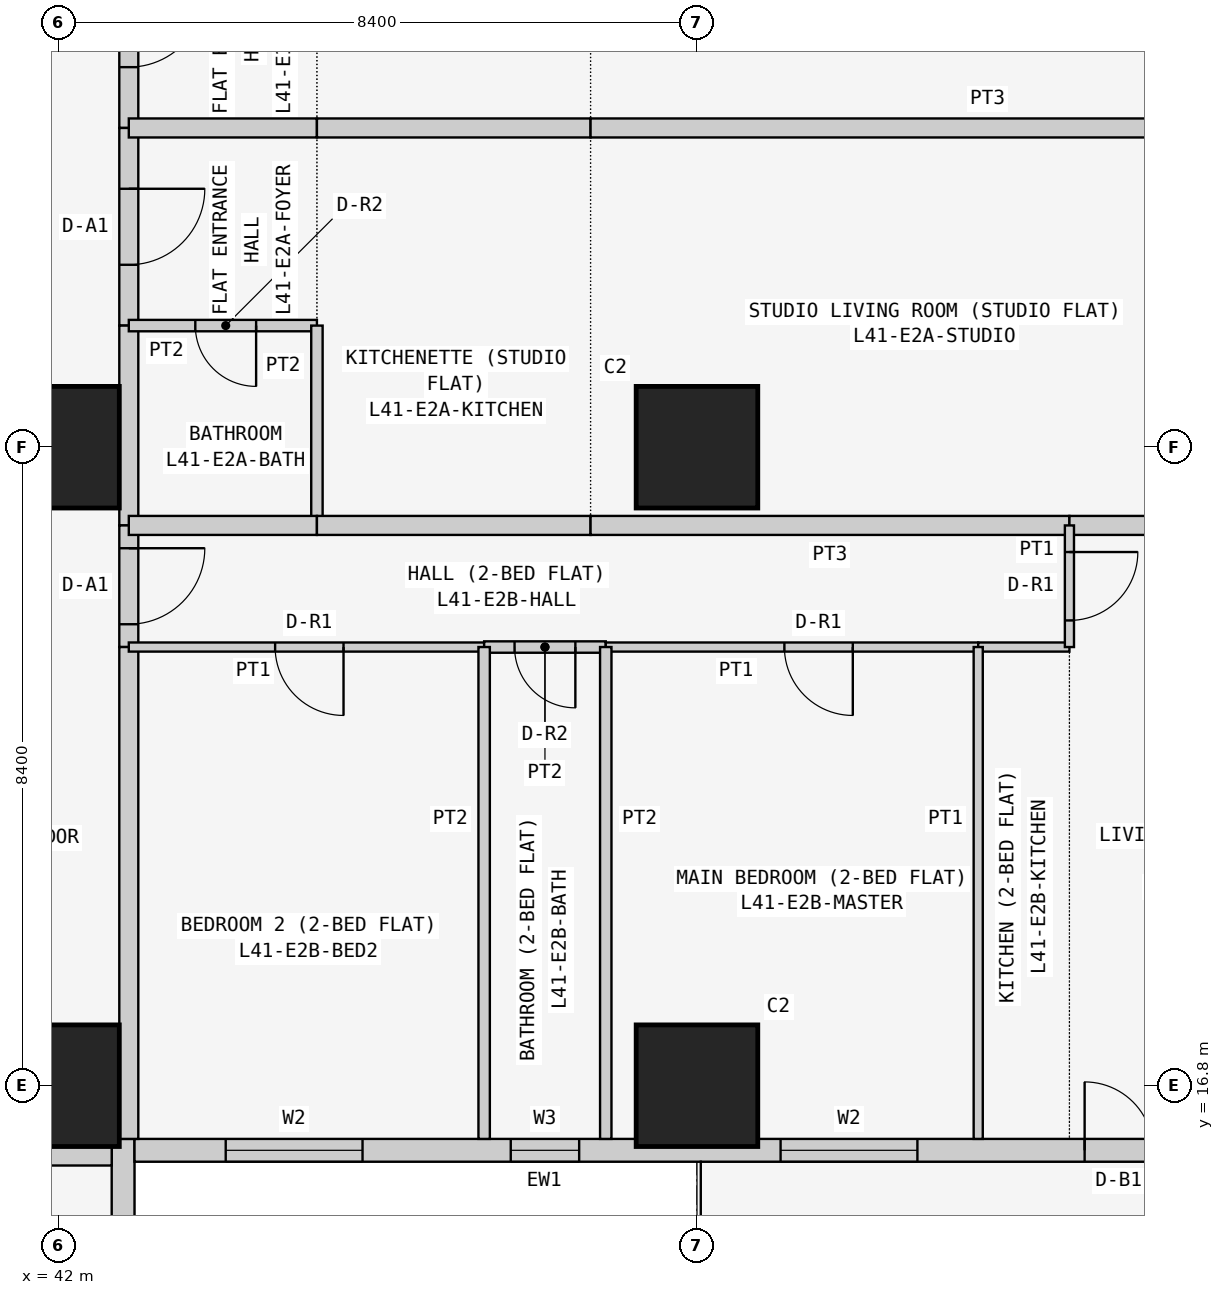
"""IFC4 building model, lengths in metres.
Left out: names, types, materials, properties, quantities, classifications, styles, units other than length and angle.
Written with IfcOpenShell. Run it as: python <this file> out.ifc"""

import sys

from ifc_helpers import new_model, si_unit, direction, frame, frame_2d, origin, origin_2d, place, context, subcontext, project, spatial, rectangle, extrude, element, fill, save


model = new_model("IFC4")
c1 = context("Model", 3, precision=1e-05, world=origin(), true_north=direction((0.0, 1.0)))
c2 = subcontext(c1, "Body", "Model", "MODEL_VIEW")
j1 = project(units=[si_unit("LENGTHUNIT", "METRE"), si_unit("PLANEANGLEUNIT", "RADIAN")], contexts=[c1])
p1 = place(None, origin())
s1 = spatial("IfcSite", under=j1, at=p1, CompositionType="ELEMENT")
p2 = place(p1, origin())
s2 = spatial("IfcBuilding", under=s1, at=p2, CompositionType="ELEMENT")
p3 = place(p2, frame((0.0, 0.0, 159.3)))
s3 = spatial("IfcBuildingStorey", under=s2, at=p3, CompositionType="ELEMENT", Elevation=159.3)
for number, where, z_axis, x_axis in (
    (1, (42.0, 16.8, 0.0), (0.0, 0.0, 1.0), (1.0, 0.0, 0.0)),
    (2, (42.0, 25.2, 0.0), (0.0, 0.0, 1.0), (1.0, 0.0, 0.0)),
    (3, (50.4, 16.8, 0.0), (0.0, 0.0, 1.0), (1.0, 0.0, 0.0)),
    (4, (50.4, 25.2, 0.0), (0.0, 0.0, 1.0), (1.0, 0.0, 0.0)),
):
    element("IfcColumn", number, at=place(p3, frame(where, z_axis=z_axis, x_axis=x_axis)), inside=s3, PredefinedType="COLUMN", context=c2, shape_type="SweptSolid", body=[
        extrude(rectangle(XDim=1.6, YDim=1.6, at=origin_2d()), origin(), (0.0, 0.0, 1.0), 3.6),
    ])
p4 = place(p3, frame((42.85, 8.8, 0.0), z_axis=(0.0, 0.0, 1.0), x_axis=(0.0, 1.0, 0.0)))
e5 = element("IfcWall", 5, at=p4, inside=s3, PredefinedType="SOLIDWALL", context=c2, shape_type="SweptSolid", body=[
    extrude(rectangle(XDim=7.3, YDim=0.3, at=frame_2d((3.65, 0.0))), origin(), (0.0, 0.0, 1.0), 3.45),
])
p5 = place(p4, frame((3.1, 0.0, 0.9)))
e6 = element("IfcOpeningElement", 6, at=p5, cuts=e5, PredefinedType="OPENING", context=c2, shape_type="SweptSolid", body=[
    extrude(rectangle(XDim=2.4, YDim=1.5, at=frame_2d((1.2, 0.75))), frame((0.0, 0.16, 0.0), z_axis=(0.0, -1.0, 0.0), x_axis=(1.0, 0.0, 0.0)), (0.0, 0.0, 1.0), 0.32),
])
p6 = place(p4, frame((0.75, 0.0, 0.9)))
e7 = element("IfcOpeningElement", 7, at=p6, cuts=e5, PredefinedType="OPENING", context=c2, shape_type="SweptSolid", body=[
    extrude(rectangle(XDim=1.2, YDim=1.5, at=frame_2d((0.6, 0.75))), frame((0.0, 0.16, 0.0), z_axis=(0.0, -1.0, 0.0), x_axis=(1.0, 0.0, 0.0)), (0.0, 0.0, 1.0), 0.32),
])
p7 = place(p3, frame((43.0, 15.95, 0.0), z_axis=(0.0, 0.0, 1.0), x_axis=(1.0, 0.0, 0.0)))
e8 = element("IfcWall", 8, at=p7, inside=s3, PredefinedType="SOLIDWALL", context=c2, shape_type="SweptSolid", body=[
    extrude(rectangle(XDim=15.4, YDim=0.3, at=frame_2d((7.7, 0.0))), origin(), (0.0, 0.0, 1.0), 3.45),
])
p8 = place(p7, frame((1.2, 0.0, 0.9)))
e9 = element("IfcOpeningElement", 9, at=p8, cuts=e8, PredefinedType="OPENING", context=c2, shape_type="SweptSolid", body=[
    extrude(rectangle(XDim=1.8, YDim=1.5, at=frame_2d((0.9, 0.75))), frame((0.0, 0.16, 0.0), z_axis=(0.0, -1.0, 0.0), x_axis=(1.0, 0.0, 0.0)), (0.0, 0.0, 1.0), 0.32),
])
p9 = place(p7, frame((4.95, 0.0, 1.5)))
e10 = element("IfcOpeningElement", 10, at=p9, cuts=e8, PredefinedType="OPENING", context=c2, shape_type="SweptSolid", body=[
    extrude(rectangle(XDim=0.9, YDim=0.7, at=frame_2d((0.45, 0.35))), frame((0.0, 0.16, 0.0), z_axis=(0.0, -1.0, 0.0), x_axis=(1.0, 0.0, 0.0)), (0.0, 0.0, 1.0), 0.32),
])
p10 = place(p7, frame((8.5, 0.0, 0.9)))
e11 = element("IfcOpeningElement", 11, at=p10, cuts=e8, PredefinedType="OPENING", context=c2, shape_type="SweptSolid", body=[
    extrude(rectangle(XDim=1.8, YDim=1.5, at=frame_2d((0.9, 0.75))), frame((0.0, 0.16, 0.0), z_axis=(0.0, -1.0, 0.0), x_axis=(1.0, 0.0, 0.0)), (0.0, 0.0, 1.0), 0.32),
])
p11 = place(p7, frame((12.5, 0.0, 0.0)))
e12 = element("IfcOpeningElement", 12, at=p11, cuts=e8, PredefinedType="OPENING", context=c2, shape_type="SweptSolid", body=[
    extrude(rectangle(XDim=0.9, YDim=2.4, at=frame_2d((0.45, 1.2))), frame((0.0, 0.16, 0.0), z_axis=(0.0, -1.0, 0.0), x_axis=(1.0, 0.0, 0.0)), (0.0, 0.0, 1.0), 0.32),
])
p12 = place(p7, frame((13.5, 0.0, 0.9)))
e13 = element("IfcOpeningElement", 13, at=p12, cuts=e8, PredefinedType="OPENING", context=c2, shape_type="SweptSolid", body=[
    extrude(rectangle(XDim=1.2, YDim=1.5, at=frame_2d((0.6, 0.75))), frame((0.0, 0.16, 0.0), z_axis=(0.0, -1.0, 0.0), x_axis=(1.0, 0.0, 0.0)), (0.0, 0.0, 1.0), 0.32),
])
p13 = place(p3, frame((42.925, 32.0, 0.0), z_axis=(0.0, 0.0, 1.0), x_axis=(0.0, -1.0, 0.0)))
e14 = element("IfcWall", 14, at=p13, inside=s3, PredefinedType="PARTITIONING", context=c2, shape_type="SweptSolid", body=[
    extrude(rectangle(XDim=2.6, YDim=0.25, at=frame_2d((1.3, 0.0))), origin(), (0.0, 0.0, 1.0), 3.45),
])
p14 = place(p13, frame((0.8, 0.0, 0.0)))
e15 = element("IfcOpeningElement", 15, at=p14, cuts=e14, PredefinedType="OPENING", context=c2, shape_type="SweptSolid", body=[
    extrude(rectangle(XDim=1.0, YDim=2.1, at=frame_2d((0.5, 1.05))), frame((0.0, 0.135, 0.0), z_axis=(0.0, -1.0, 0.0), x_axis=(1.0, 0.0, 0.0)), (0.0, 0.0, 1.0), 0.27),
])
p15 = place(p3, frame((42.925, 29.4, 0.0), z_axis=(0.0, 0.0, 1.0), x_axis=(0.0, -1.0, 0.0)))
e16 = element("IfcWall", 16, at=p15, inside=s3, PredefinedType="PARTITIONING", context=c2, shape_type="SweptSolid", body=[
    extrude(rectangle(XDim=2.6, YDim=0.25, at=frame_2d((1.3, 0.0))), origin(), (0.0, 0.0, 1.0), 3.45),
])
p16 = place(p15, frame((0.8, 0.0, 0.0)))
e17 = element("IfcOpeningElement", 17, at=p16, cuts=e16, PredefinedType="OPENING", context=c2, shape_type="SweptSolid", body=[
    extrude(rectangle(XDim=1.0, YDim=2.1, at=frame_2d((0.5, 1.05))), frame((0.0, 0.135, 0.0), z_axis=(0.0, -1.0, 0.0), x_axis=(1.0, 0.0, 0.0)), (0.0, 0.0, 1.0), 0.27),
])
p17 = place(p3, frame((42.925, 26.8, 0.0), z_axis=(0.0, 0.0, 1.0), x_axis=(0.0, -1.0, 0.0)))
e18 = element("IfcWall", 18, at=p17, inside=s3, PredefinedType="PARTITIONING", context=c2, shape_type="SweptSolid", body=[
    extrude(rectangle(XDim=2.629, YDim=0.25, at=frame_2d((1.314, 0.0))), origin(), (0.0, 0.0, 1.0), 3.45),
])
p18 = place(p3, frame((42.925, 24.171, 0.0), z_axis=(0.0, 0.0, 1.0), x_axis=(0.0, -1.0, 0.0)))
e19 = element("IfcWall", 19, at=p18, inside=s3, PredefinedType="PARTITIONING", context=c2, shape_type="SweptSolid", body=[
    extrude(rectangle(XDim=1.6, YDim=0.25, at=frame_2d((0.8, 0.0))), origin(), (0.0, 0.0, 1.0), 3.45),
])
p19 = place(p18, frame((0.3, 0.0, 0.0)))
e20 = element("IfcOpeningElement", 20, at=p19, cuts=e19, PredefinedType="OPENING", context=c2, shape_type="SweptSolid", body=[
    extrude(rectangle(XDim=1.0, YDim=2.1, at=frame_2d((0.5, 1.05))), frame((0.0, 0.135, 0.0), z_axis=(0.0, -1.0, 0.0), x_axis=(1.0, 0.0, 0.0)), (0.0, 0.0, 1.0), 0.27),
])
for number, where, z_axis, x_axis in (
    (21, (42.925, 22.571, 0.0), (0.0, 0.0, 1.0), (0.0, -1.0, 0.0)),
    (22, (42.7, 15.875, 0.0), (0.0, 0.0, 1.0), (-1.0, 0.0, 0.0)),
):
    element("IfcWall", number, at=place(p3, frame(where, z_axis=z_axis, x_axis=x_axis)), inside=s3, PredefinedType="PARTITIONING", context=c2, shape_type="SweptSolid", body=[
        extrude(rectangle(XDim=6.471, YDim=0.25, at=frame_2d((3.235, 0.0))), origin(), (0.0, 0.0, 1.0), 3.45),
    ])
p20 = place(p3, frame((42.925, 29.4, 0.0), z_axis=(0.0, 0.0, 1.0), x_axis=(1.0, 0.0, 0.0)))
e23 = element("IfcWall", 23, at=p20, inside=s3, PredefinedType="PARTITIONING", context=c2, shape_type="SweptSolid", body=[
    extrude(rectangle(XDim=2.475, YDim=0.25, at=frame_2d((1.237, 0.0))), origin(), (0.0, 0.0, 1.0), 3.45),
])
p21 = place(p3, frame((45.4, 29.4, 0.0), z_axis=(0.0, 0.0, 1.0), x_axis=(1.0, 0.0, 0.0)))
e24 = element("IfcWall", 24, at=p21, inside=s3, PredefinedType="PARTITIONING", context=c2, shape_type="SweptSolid", body=[
    extrude(rectangle(XDim=3.6, YDim=0.25, at=frame_2d((1.8, 0.0))), origin(), (0.0, 0.0, 1.0), 3.45),
])
p22 = place(p3, frame((49.0, 29.4, 0.0), z_axis=(0.0, 0.0, 1.0), x_axis=(1.0, 0.0, 0.0)))
e25 = element("IfcWall", 25, at=p22, inside=s3, PredefinedType="PARTITIONING", context=c2, shape_type="SweptSolid", body=[
    extrude(rectangle(XDim=10.45, YDim=0.25, at=frame_2d((5.225, 0.0))), origin(), (0.0, 0.0, 1.0), 3.45),
])
p23 = place(p3, frame((45.4, 26.8, 0.0), z_axis=(0.0, 0.0, 1.0), x_axis=(-1.0, 0.0, 0.0)))
e26 = element("IfcWall", 26, at=p23, inside=s3, PredefinedType="PARTITIONING", context=c2, shape_type="SweptSolid", body=[
    extrude(rectangle(XDim=2.475, YDim=0.15, at=frame_2d((1.237, 0.0))), origin(), (0.0, 0.0, 1.0), 3.45),
])
p24 = place(p23, frame((0.8, 0.0, 0.0)))
e27 = element("IfcOpeningElement", 27, at=p24, cuts=e26, PredefinedType="OPENING", context=c2, shape_type="SweptSolid", body=[
    extrude(rectangle(XDim=0.8, YDim=2.1, at=frame_2d((0.4, 1.05))), frame((0.0, 0.085, 0.0), z_axis=(0.0, -1.0, 0.0), x_axis=(1.0, 0.0, 0.0)), (0.0, 0.0, 1.0), 0.17),
])
p25 = place(p3, frame((45.4, 26.8, 0.0), z_axis=(0.0, 0.0, 1.0), x_axis=(0.0, -1.0, 0.0)))
e28 = element("IfcWall", 28, at=p25, inside=s3, PredefinedType="PARTITIONING", context=c2, shape_type="SweptSolid", body=[
    extrude(rectangle(XDim=2.629, YDim=0.15, at=frame_2d((1.314, 0.0))), origin(), (0.0, 0.0, 1.0), 3.45),
])
p26 = place(p3, frame((45.4, 24.171, 0.0), z_axis=(0.0, 0.0, 1.0), x_axis=(-1.0, 0.0, 0.0)))
e29 = element("IfcWall", 29, at=p26, inside=s3, PredefinedType="PARTITIONING", context=c2, shape_type="SweptSolid", body=[
    extrude(rectangle(XDim=2.475, YDim=0.25, at=frame_2d((1.237, 0.0))), origin(), (0.0, 0.0, 1.0), 3.45),
])
p27 = place(p3, frame((49.0, 24.171, 0.0), z_axis=(0.0, 0.0, 1.0), x_axis=(-1.0, 0.0, 0.0)))
e30 = element("IfcWall", 30, at=p27, inside=s3, PredefinedType="PARTITIONING", context=c2, shape_type="SweptSolid", body=[
    extrude(rectangle(XDim=3.6, YDim=0.25, at=frame_2d((1.8, 0.0))), origin(), (0.0, 0.0, 1.0), 3.45),
])
p28 = place(p3, frame((55.3, 24.171, 0.0), z_axis=(0.0, 0.0, 1.0), x_axis=(-1.0, 0.0, 0.0)))
e31 = element("IfcWall", 31, at=p28, inside=s3, PredefinedType="PARTITIONING", context=c2, shape_type="SweptSolid", body=[
    extrude(rectangle(XDim=6.3, YDim=0.25, at=frame_2d((3.15, 0.0))), origin(), (0.0, 0.0, 1.0), 3.45),
])
p29 = place(p3, frame((59.45, 24.171, 0.0), z_axis=(0.0, 0.0, 1.0), x_axis=(-1.0, 0.0, 0.0)))
e32 = element("IfcWall", 32, at=p29, inside=s3, PredefinedType="PARTITIONING", context=c2, shape_type="SweptSolid", body=[
    extrude(rectangle(XDim=4.15, YDim=0.25, at=frame_2d((2.075, 0.0))), origin(), (0.0, 0.0, 1.0), 3.45),
])
p30 = place(p3, frame((47.6, 22.571, 0.0), z_axis=(0.0, 0.0, 1.0), x_axis=(-1.0, 0.0, 0.0)))
e33 = element("IfcWall", 33, at=p30, inside=s3, PredefinedType="PARTITIONING", context=c2, shape_type="SweptSolid", body=[
    extrude(rectangle(XDim=4.675, YDim=0.12, at=frame_2d((2.337, 0.0))), origin(), (0.0, 0.0, 1.0), 3.45),
])
p31 = place(p30, frame((1.85, 0.0, 0.0)))
e34 = element("IfcOpeningElement", 34, at=p31, cuts=e33, PredefinedType="OPENING", context=c2, shape_type="SweptSolid", body=[
    extrude(rectangle(XDim=0.9, YDim=2.1, at=frame_2d((0.45, 1.05))), frame((0.0, 0.07, 0.0), z_axis=(0.0, -1.0, 0.0), x_axis=(1.0, 0.0, 0.0)), (0.0, 0.0, 1.0), 0.14),
])
p32 = place(p3, frame((49.2, 22.571, 0.0), z_axis=(0.0, 0.0, 1.0), x_axis=(-1.0, 0.0, 0.0)))
e35 = element("IfcWall", 35, at=p32, inside=s3, PredefinedType="PARTITIONING", context=c2, shape_type="SweptSolid", body=[
    extrude(rectangle(XDim=1.6, YDim=0.15, at=frame_2d((0.8, 0.0))), origin(), (0.0, 0.0, 1.0), 3.45),
])
p33 = place(p32, frame((0.4, 0.0, 0.0)))
e36 = element("IfcOpeningElement", 36, at=p33, cuts=e35, PredefinedType="OPENING", context=c2, shape_type="SweptSolid", body=[
    extrude(rectangle(XDim=0.8, YDim=2.1, at=frame_2d((0.4, 1.05))), frame((0.0, 0.085, 0.0), z_axis=(0.0, -1.0, 0.0), x_axis=(1.0, 0.0, 0.0)), (0.0, 0.0, 1.0), 0.17),
])
p34 = place(p3, frame((54.1, 22.571, 0.0), z_axis=(0.0, 0.0, 1.0), x_axis=(-1.0, 0.0, 0.0)))
e37 = element("IfcWall", 37, at=p34, inside=s3, PredefinedType="PARTITIONING", context=c2, shape_type="SweptSolid", body=[
    extrude(rectangle(XDim=4.9, YDim=0.12, at=frame_2d((2.45, 0.0))), origin(), (0.0, 0.0, 1.0), 3.45),
])
p35 = place(p34, frame((1.65, 0.0, 0.0)))
e38 = element("IfcOpeningElement", 38, at=p35, cuts=e37, PredefinedType="OPENING", context=c2, shape_type="SweptSolid", body=[
    extrude(rectangle(XDim=0.9, YDim=2.1, at=frame_2d((0.45, 1.05))), frame((0.0, 0.07, 0.0), z_axis=(0.0, -1.0, 0.0), x_axis=(1.0, 0.0, 0.0)), (0.0, 0.0, 1.0), 0.14),
])
p36 = place(p3, frame((55.3, 22.571, 0.0), z_axis=(0.0, 0.0, 1.0), x_axis=(-1.0, 0.0, 0.0)))
e39 = element("IfcWall", 39, at=p36, inside=s3, PredefinedType="PARTITIONING", context=c2, shape_type="SweptSolid", body=[
    extrude(rectangle(XDim=1.2, YDim=0.12, at=frame_2d((0.6, 0.0))), origin(), (0.0, 0.0, 1.0), 3.45),
])
p37 = place(p3, frame((55.3, 24.171, 0.0), z_axis=(0.0, 0.0, 1.0), x_axis=(0.0, -1.0, 0.0)))
e40 = element("IfcWall", 40, at=p37, inside=s3, PredefinedType="PARTITIONING", context=c2, shape_type="SweptSolid", body=[
    extrude(rectangle(XDim=1.6, YDim=0.12, at=frame_2d((0.8, 0.0))), origin(), (0.0, 0.0, 1.0), 3.45),
])
p38 = place(p37, frame((0.35, 0.0, 0.0)))
e41 = element("IfcOpeningElement", 41, at=p38, cuts=e40, PredefinedType="OPENING", context=c2, shape_type="SweptSolid", body=[
    extrude(rectangle(XDim=0.9, YDim=2.1, at=frame_2d((0.45, 1.05))), frame((0.0, 0.07, 0.0), z_axis=(0.0, -1.0, 0.0), x_axis=(1.0, 0.0, 0.0)), (0.0, 0.0, 1.0), 0.14),
])
for number, where, z_axis, x_axis in (
    (42, (47.6, 22.571, 0.0), (0.0, 0.0, 1.0), (0.0, -1.0, 0.0)),
    (43, (49.2, 22.571, 0.0), (0.0, 0.0, 1.0), (0.0, -1.0, 0.0)),
):
    element("IfcWall", number, at=place(p3, frame(where, z_axis=z_axis, x_axis=x_axis)), inside=s3, PredefinedType="PARTITIONING", context=c2, shape_type="SweptSolid", body=[
        extrude(rectangle(XDim=6.471, YDim=0.15, at=frame_2d((3.235, 0.0))), origin(), (0.0, 0.0, 1.0), 3.45),
    ])
p39 = place(p3, frame((54.1, 22.571, 0.0), z_axis=(0.0, 0.0, 1.0), x_axis=(0.0, -1.0, 0.0)))
e44 = element("IfcWall", 44, at=p39, inside=s3, PredefinedType="PARTITIONING", context=c2, shape_type="SweptSolid", body=[
    extrude(rectangle(XDim=6.471, YDim=0.12, at=frame_2d((3.235, 0.0))), origin(), (0.0, 0.0, 1.0), 3.45),
])
p40 = place(p8, origin())
e45 = element("IfcWindow", 45, at=p40, inside=s3, PartitioningType="SINGLE_PANEL", PredefinedType="WINDOW", context=c2, shape_type="SweptSolid", body=[
    extrude(rectangle(XDim=1.8, YDim=1.5, at=frame_2d((0.9, 0.75))), frame((0.0, 0.03, 0.0), z_axis=(0.0, -1.0, 0.0), x_axis=(1.0, 0.0, 0.0)), (0.0, 0.0, 1.0), 0.06),
])
fill(e9, e45)
p41 = place(p9, origin())
e46 = element("IfcWindow", 46, at=p41, inside=s3, PartitioningType="SINGLE_PANEL", PredefinedType="WINDOW", context=c2, shape_type="SweptSolid", body=[
    extrude(rectangle(XDim=0.9, YDim=0.7, at=frame_2d((0.45, 0.35))), frame((0.0, 0.03, 0.0), z_axis=(0.0, -1.0, 0.0), x_axis=(1.0, 0.0, 0.0)), (0.0, 0.0, 1.0), 0.06),
])
fill(e10, e46)
p42 = place(p10, origin())
e47 = element("IfcWindow", 47, at=p42, inside=s3, PartitioningType="SINGLE_PANEL", PredefinedType="WINDOW", context=c2, shape_type="SweptSolid", body=[
    extrude(rectangle(XDim=1.8, YDim=1.5, at=frame_2d((0.9, 0.75))), frame((0.0, 0.03, 0.0), z_axis=(0.0, -1.0, 0.0), x_axis=(1.0, 0.0, 0.0)), (0.0, 0.0, 1.0), 0.06),
])
fill(e11, e47)
p43 = place(p11, origin())
e48 = element("IfcDoor", 48, at=p43, inside=s3, OperationType="SINGLE_SWING_LEFT", PredefinedType="DOOR", context=c2, shape_type="SweptSolid", body=[
    extrude(rectangle(XDim=0.9, YDim=2.4, at=frame_2d((0.45, 1.2))), frame((0.0, 0.025, 0.0), z_axis=(0.0, -1.0, 0.0), x_axis=(1.0, 0.0, 0.0)), (0.0, 0.0, 1.0), 0.05),
])
fill(e12, e48)
p44 = place(p14, origin())
e49 = element("IfcDoor", 49, at=p44, inside=s3, OperationType="SINGLE_SWING_LEFT", PredefinedType="DOOR", context=c2, shape_type="SweptSolid", body=[
    extrude(rectangle(XDim=1.0, YDim=2.1, at=frame_2d((0.5, 1.05))), frame((0.0, 0.025, 0.0), z_axis=(0.0, -1.0, 0.0), x_axis=(1.0, 0.0, 0.0)), (0.0, 0.0, 1.0), 0.05),
])
fill(e15, e49)
p45 = place(p16, origin())
e50 = element("IfcDoor", 50, at=p45, inside=s3, OperationType="SINGLE_SWING_LEFT", PredefinedType="DOOR", context=c2, shape_type="SweptSolid", body=[
    extrude(rectangle(XDim=1.0, YDim=2.1, at=frame_2d((0.5, 1.05))), frame((0.0, 0.025, 0.0), z_axis=(0.0, -1.0, 0.0), x_axis=(1.0, 0.0, 0.0)), (0.0, 0.0, 1.0), 0.05),
])
fill(e17, e50)
p46 = place(p24, origin())
e51 = element("IfcDoor", 51, at=p46, inside=s3, OperationType="SINGLE_SWING_LEFT", PredefinedType="DOOR", context=c2, shape_type="SweptSolid", body=[
    extrude(rectangle(XDim=0.8, YDim=2.1, at=frame_2d((0.4, 1.05))), frame((0.0, 0.025, 0.0), z_axis=(0.0, -1.0, 0.0), x_axis=(1.0, 0.0, 0.0)), (0.0, 0.0, 1.0), 0.05),
])
fill(e27, e51)
p47 = place(p19, origin())
e52 = element("IfcDoor", 52, at=p47, inside=s3, OperationType="SINGLE_SWING_LEFT", PredefinedType="DOOR", context=c2, shape_type="SweptSolid", body=[
    extrude(rectangle(XDim=1.0, YDim=2.1, at=frame_2d((0.5, 1.05))), frame((0.0, 0.025, 0.0), z_axis=(0.0, -1.0, 0.0), x_axis=(1.0, 0.0, 0.0)), (0.0, 0.0, 1.0), 0.05),
])
fill(e20, e52)
p48 = place(p31, origin())
e53 = element("IfcDoor", 53, at=p48, inside=s3, OperationType="SINGLE_SWING_LEFT", PredefinedType="DOOR", context=c2, shape_type="SweptSolid", body=[
    extrude(rectangle(XDim=0.9, YDim=2.1, at=frame_2d((0.45, 1.05))), frame((0.0, 0.025, 0.0), z_axis=(0.0, -1.0, 0.0), x_axis=(1.0, 0.0, 0.0)), (0.0, 0.0, 1.0), 0.05),
])
fill(e34, e53)
p49 = place(p33, origin())
e54 = element("IfcDoor", 54, at=p49, inside=s3, OperationType="SINGLE_SWING_LEFT", PredefinedType="DOOR", context=c2, shape_type="SweptSolid", body=[
    extrude(rectangle(XDim=0.8, YDim=2.1, at=frame_2d((0.4, 1.05))), frame((0.0, 0.025, 0.0), z_axis=(0.0, -1.0, 0.0), x_axis=(1.0, 0.0, 0.0)), (0.0, 0.0, 1.0), 0.05),
])
fill(e36, e54)
p50 = place(p35, origin())
e55 = element("IfcDoor", 55, at=p50, inside=s3, OperationType="SINGLE_SWING_LEFT", PredefinedType="DOOR", context=c2, shape_type="SweptSolid", body=[
    extrude(rectangle(XDim=0.9, YDim=2.1, at=frame_2d((0.45, 1.05))), frame((0.0, 0.025, 0.0), z_axis=(0.0, -1.0, 0.0), x_axis=(1.0, 0.0, 0.0)), (0.0, 0.0, 1.0), 0.05),
])
fill(e38, e55)
p51 = place(p38, origin())
e56 = element("IfcDoor", 56, at=p51, inside=s3, OperationType="SINGLE_SWING_LEFT", PredefinedType="DOOR", context=c2, shape_type="SweptSolid", body=[
    extrude(rectangle(XDim=0.9, YDim=2.1, at=frame_2d((0.45, 1.05))), frame((0.0, 0.025, 0.0), z_axis=(0.0, -1.0, 0.0), x_axis=(1.0, 0.0, 0.0)), (0.0, 0.0, 1.0), 0.05),
])
fill(e41, e56)
save(model, sys.argv[1])
